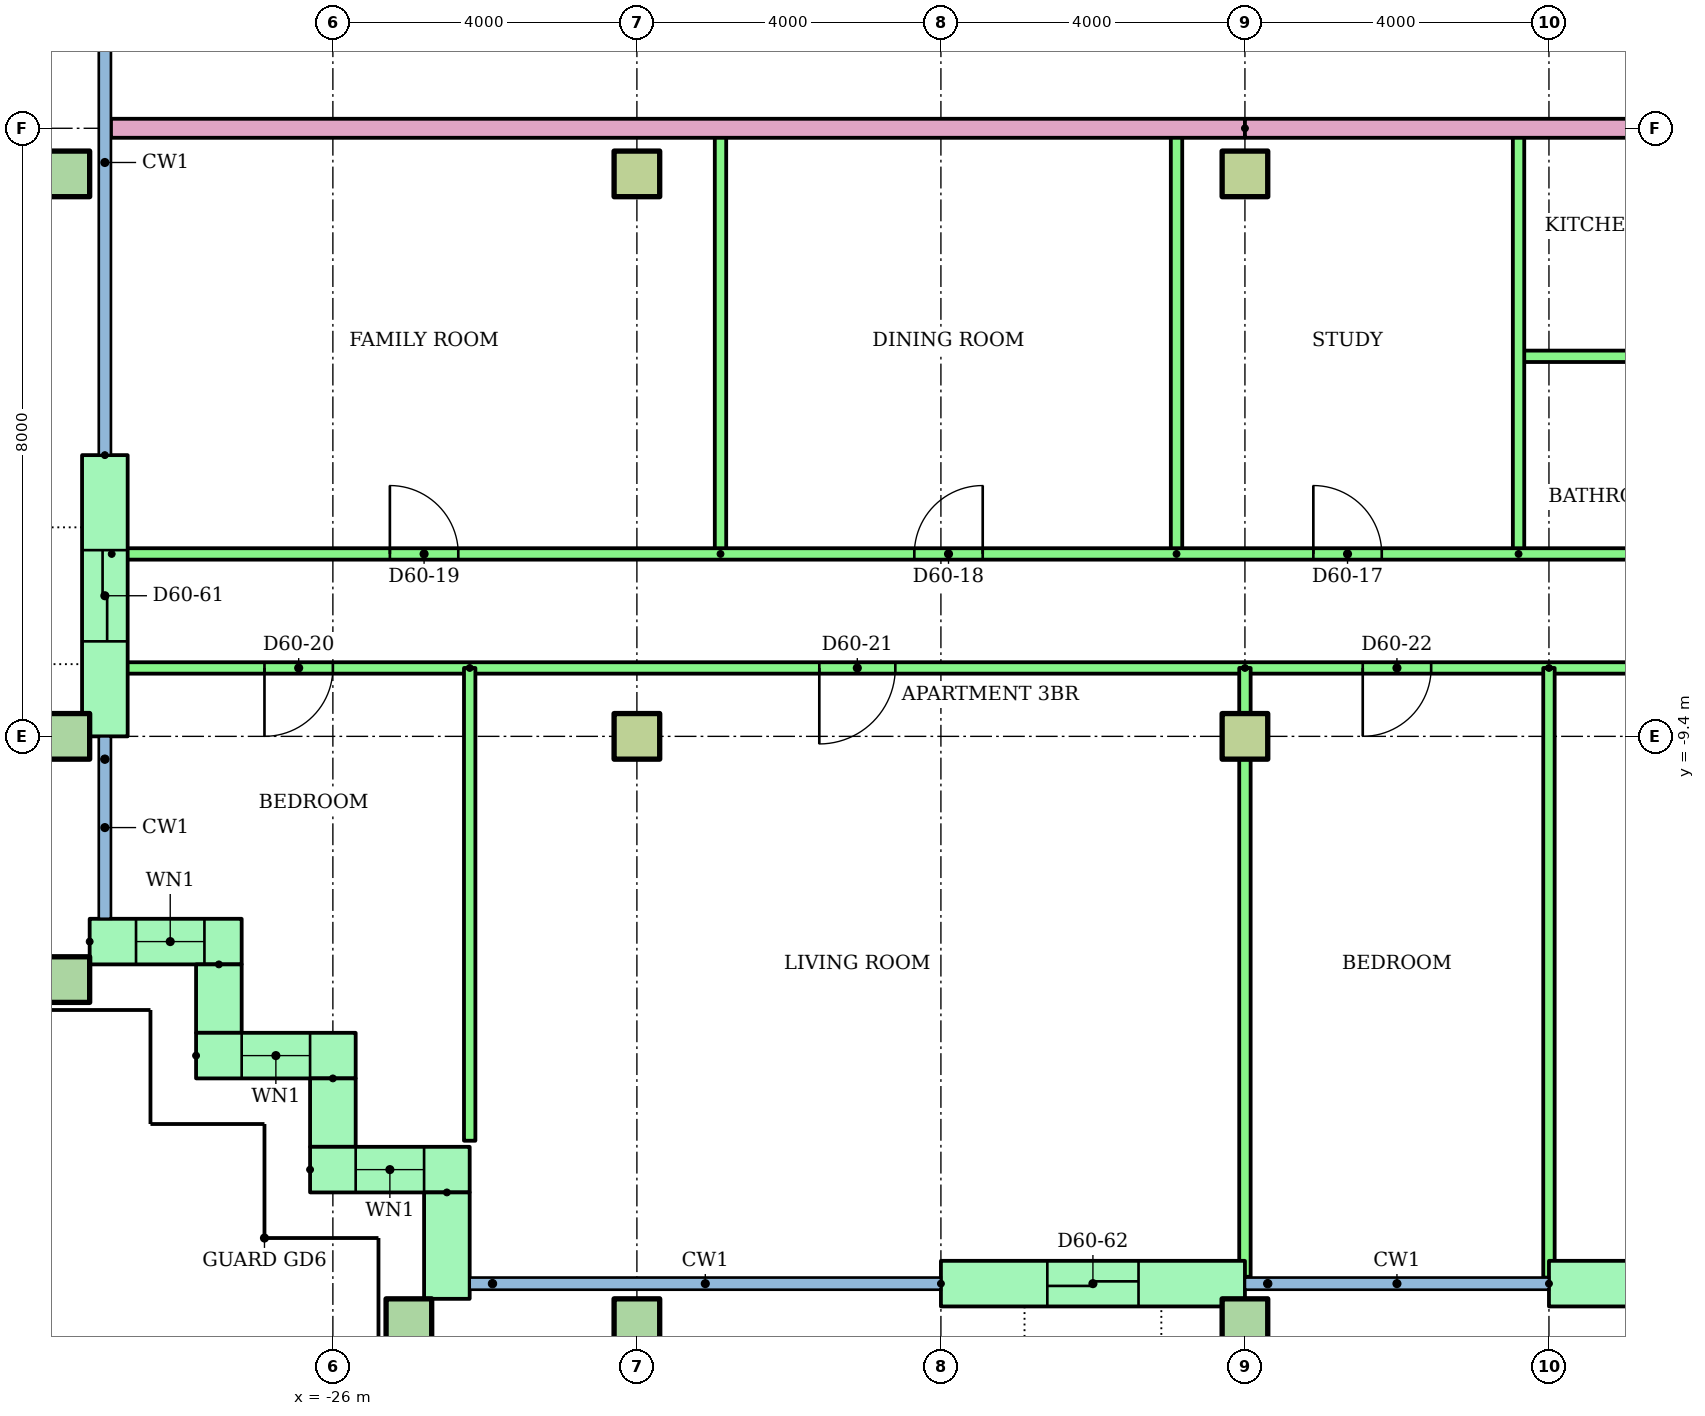
"""IFC4 building model, lengths in metres.
Left out: names, types, materials, properties, quantities, classifications, styles, units other than length and angle.
Written with IfcOpenShell. Run it as: python <this file> out.ifc"""

import sys

from ifc_helpers import new_model, si_unit, direction, frame, frame_2d, origin, origin_2d, place, context, subcontext, project, spatial, rectangle, hollow_rectangle, extrude, element, fill, save


model = new_model("IFC4")
c1 = context("Model", 3, precision=1e-05, world=origin(), true_north=direction((0.0, 1.0)))
c2 = subcontext(c1, "Body", "Model", "MODEL_VIEW")
j1 = project(units=[si_unit("LENGTHUNIT", "METRE"), si_unit("PLANEANGLEUNIT", "RADIAN")], contexts=[c1])
p1 = place(None, origin())
s1 = spatial("IfcSite", under=j1, at=p1, CompositionType="ELEMENT")
p2 = place(p1, origin())
s2 = spatial("IfcBuilding", under=s1, at=p2, CompositionType="ELEMENT")
p3 = place(p2, frame((0.0, 0.0, 230.0)))
s3 = spatial("IfcBuildingStorey", under=s2, at=p3, CompositionType="ELEMENT", Elevation=230.0)
for number, where in (
    (1, (-25.0, -17.1, 0.0)),
    (2, (-22.0, -17.1, 0.0)),
    (3, (-14.0, -17.1, 0.0)),
    (4, (-29.5, -12.6, 0.0)),
    (5, (-29.5, -9.4, 0.0)),
):
    element("IfcColumn", number, at=place(p3, frame(where)), inside=s3, PredefinedType="COLUMN", context=c2, shape_type="SweptSolid", body=[
        extrude(hollow_rectangle(XDim=0.6, YDim=0.6, WallThickness=0.03, at=origin_2d()), origin(), (0.0, 0.0, 1.0), 3.2),
    ])
for number, where in (
    (6, (-22.0, -9.4, 0.0)),
    (7, (-14.0, -9.4, 0.0)),
):
    element("IfcColumn", number, at=place(p3, frame(where)), inside=s3, PredefinedType="COLUMN", context=c2, shape_type="SweptSolid", body=[
        extrude(rectangle(XDim=0.6, YDim=0.6, at=origin_2d()), origin(), (0.0, 0.0, 1.0), 3.2),
    ])
p4 = place(p3, frame((-29.5, -2.0, 0.0)))
e8 = element("IfcColumn", 8, at=p4, inside=s3, PredefinedType="COLUMN", context=c2, shape_type="SweptSolid", body=[
    extrude(hollow_rectangle(XDim=0.6, YDim=0.6, WallThickness=0.03, at=origin_2d()), origin(), (0.0, 0.0, 1.0), 3.2),
])
for number, where in (
    (9, (-22.0, -2.0, 0.0)),
    (10, (-14.0, -2.0, 0.0)),
):
    element("IfcColumn", number, at=place(p3, frame(where)), inside=s3, PredefinedType="COLUMN", context=c2, shape_type="SweptSolid", body=[
        extrude(rectangle(XDim=0.6, YDim=0.6, at=origin_2d()), origin(), (0.0, 0.0, 1.0), 3.2),
    ])
p5 = place(p3, frame((-29.0, -5.7, 0.0), z_axis=(0.0, 0.0, 1.0), x_axis=(0.0, -1.0, 0.0)))
e11 = element("IfcWall", 11, at=p5, inside=s3, PredefinedType="STANDARD", context=c2, shape_type="SweptSolid", body=[
    extrude(rectangle(XDim=3.7, YDim=0.6, at=frame_2d((1.85, 0.0))), origin(), (0.0, 0.0, 1.0), 2.92),
])
p6 = place(p5, frame((1.25, 0.0, 0.0)))
e12 = element("IfcOpeningElement", 12, at=p6, cuts=e11, PredefinedType="OPENING", context=c2, shape_type="SweptSolid", body=[
    extrude(rectangle(XDim=1.2, YDim=2.1, at=frame_2d((0.6, 1.05))), frame((0.0, 0.31, 0.0), z_axis=(0.0, -1.0, 0.0), x_axis=(1.0, 0.0, 0.0)), (0.0, 0.0, 1.0), 0.62),
])
p7 = place(p3, frame((-29.2, -12.1, 0.0)))
e13 = element("IfcWall", 13, at=p7, inside=s3, PredefinedType="STANDARD", context=c2, shape_type="SweptSolid", body=[
    extrude(rectangle(XDim=2.0, YDim=0.6, at=frame_2d((1.0, 0.0))), origin(), (0.0, 0.0, 1.0), 2.92),
])
p8 = place(p7, frame((0.61, 0.0, 0.9)))
e14 = element("IfcOpeningElement", 14, at=p8, cuts=e13, PredefinedType="OPENING", context=c2, shape_type="SweptSolid", body=[
    extrude(rectangle(XDim=0.9, YDim=1.5, at=frame_2d((0.45, 0.75))), frame((0.0, 0.31, 0.0), z_axis=(0.0, -1.0, 0.0), x_axis=(1.0, 0.0, 0.0)), (0.0, 0.0, 1.0), 0.62),
])
p9 = place(p3, frame((-27.5, -12.4, 0.0), z_axis=(0.0, 0.0, 1.0), x_axis=(0.0, -1.0, 0.0)))
e15 = element("IfcWall", 15, at=p9, inside=s3, PredefinedType="STANDARD", context=c2, shape_type="SweptSolid", body=[
    extrude(rectangle(XDim=0.9, YDim=0.6, at=frame_2d((0.45, 0.0))), origin(), (0.0, 0.0, 1.0), 2.92),
])
p10 = place(p3, frame((-27.8, -13.6, 0.0)))
e16 = element("IfcWall", 16, at=p10, inside=s3, PredefinedType="STANDARD", context=c2, shape_type="SweptSolid", body=[
    extrude(rectangle(XDim=2.1, YDim=0.6, at=frame_2d((1.05, 0.0))), origin(), (0.0, 0.0, 1.0), 2.92),
])
p11 = place(p10, frame((0.6, 0.0, 0.9)))
e17 = element("IfcOpeningElement", 17, at=p11, cuts=e16, PredefinedType="OPENING", context=c2, shape_type="SweptSolid", body=[
    extrude(rectangle(XDim=0.9, YDim=1.5, at=frame_2d((0.45, 0.75))), frame((0.0, 0.31, 0.0), z_axis=(0.0, -1.0, 0.0), x_axis=(1.0, 0.0, 0.0)), (0.0, 0.0, 1.0), 0.62),
])
p12 = place(p3, frame((-26.0, -13.9, 0.0), z_axis=(0.0, 0.0, 1.0), x_axis=(0.0, -1.0, 0.0)))
e18 = element("IfcWall", 18, at=p12, inside=s3, PredefinedType="STANDARD", context=c2, shape_type="SweptSolid", body=[
    extrude(rectangle(XDim=0.9, YDim=0.6, at=frame_2d((0.45, 0.0))), origin(), (0.0, 0.0, 1.0), 2.92),
])
p13 = place(p3, frame((-26.3, -15.1, 0.0)))
e19 = element("IfcWall", 19, at=p13, inside=s3, PredefinedType="STANDARD", context=c2, shape_type="SweptSolid", body=[
    extrude(rectangle(XDim=2.1, YDim=0.6, at=frame_2d((1.05, 0.0))), origin(), (0.0, 0.0, 1.0), 2.92),
])
p14 = place(p13, frame((0.6, 0.0, 0.9)))
e20 = element("IfcOpeningElement", 20, at=p14, cuts=e19, PredefinedType="OPENING", context=c2, shape_type="SweptSolid", body=[
    extrude(rectangle(XDim=0.9, YDim=1.5, at=frame_2d((0.45, 0.75))), frame((0.0, 0.31, 0.0), z_axis=(0.0, -1.0, 0.0), x_axis=(1.0, 0.0, 0.0)), (0.0, 0.0, 1.0), 0.62),
])
p15 = place(p3, frame((-24.5, -15.4, 0.0), z_axis=(0.0, 0.0, 1.0), x_axis=(0.0, -1.0, 0.0)))
e21 = element("IfcWall", 21, at=p15, inside=s3, PredefinedType="STANDARD", context=c2, shape_type="SweptSolid", body=[
    extrude(rectangle(XDim=1.4, YDim=0.6, at=frame_2d((0.7, 0.0))), origin(), (0.0, 0.0, 1.0), 2.92),
])
p16 = place(p3, frame((-18.0, -16.6, 0.0)))
e22 = element("IfcWall", 22, at=p16, inside=s3, PredefinedType="STANDARD", context=c2, shape_type="SweptSolid", body=[
    extrude(rectangle(XDim=4.0, YDim=0.6, at=frame_2d((2.0, 0.0))), origin(), (0.0, 0.0, 1.0), 2.92),
])
p17 = place(p16, frame((1.4, 0.0, 0.0)))
e23 = element("IfcOpeningElement", 23, at=p17, cuts=e22, PredefinedType="OPENING", context=c2, shape_type="SweptSolid", body=[
    extrude(rectangle(XDim=1.2, YDim=2.1, at=frame_2d((0.6, 1.05))), frame((0.0, 0.31, 0.0), z_axis=(0.0, -1.0, 0.0), x_axis=(1.0, 0.0, 0.0)), (0.0, 0.0, 1.0), 0.62),
])
p18 = place(p3, frame((-10.0, -16.6, 0.0)))
e24 = element("IfcWall", 24, at=p18, inside=s3, PredefinedType="STANDARD", context=c2, shape_type="SweptSolid", body=[
    extrude(rectangle(XDim=4.0, YDim=0.6, at=frame_2d((2.0, 0.0))), origin(), (0.0, 0.0, 1.0), 2.92),
])
p19 = place(p18, frame((1.4, 0.0, 0.0)))
e25 = element("IfcOpeningElement", 25, at=p19, cuts=e24, PredefinedType="OPENING", context=c2, shape_type="SweptSolid", body=[
    extrude(rectangle(XDim=1.2, YDim=2.1, at=frame_2d((0.6, 1.05))), frame((0.0, 0.31, 0.0), z_axis=(0.0, -1.0, 0.0), x_axis=(1.0, 0.0, 0.0)), (0.0, 0.0, 1.0), 0.62),
])
p20 = place(p3, frame((-8.0, -4.4, 0.0), z_axis=(0.0, 0.0, 1.0), x_axis=(-1.0, 0.0, 0.0)))
e26 = element("IfcWall", 26, at=p20, inside=s3, PredefinedType="PARTITIONING", context=c2, shape_type="SweptSolid", body=[
    extrude(rectangle(XDim=2.4, YDim=0.15, at=frame_2d((1.2, 0.0))), origin(), (0.0, 0.0, 1.0), 2.4),
])
for number, where, z_axis, x_axis in (
    (27, (-10.4, -7.0, 0.0), (0.0, 0.0, 1.0), (0.0, 1.0, 0.0)),
    (28, (-14.9, -7.0, 0.0), (0.0, 0.0, 1.0), (0.0, 1.0, 0.0)),
    (29, (-20.9, -7.0, 0.0), (0.0, 0.0, 1.0), (0.0, 1.0, 0.0)),
):
    element("IfcWall", number, at=place(p3, frame(where, z_axis=z_axis, x_axis=x_axis)), inside=s3, PredefinedType="PARTITIONING", context=c2, shape_type="SweptSolid", body=[
        extrude(rectangle(XDim=5.6, YDim=0.15, at=frame_2d((2.8, 0.0))), origin(), (0.0, 0.0, 1.0), 2.4),
    ])
p21 = place(p3, frame((-28.91, -7.0, 0.0)))
e30 = element("IfcWall", 30, at=p21, inside=s3, PredefinedType="PARTITIONING", context=c2, shape_type="SweptSolid", body=[
    extrude(rectangle(XDim=20.91, YDim=0.15, at=frame_2d((10.455, 0.0))), origin(), (0.0, 0.0, 1.0), 2.4),
])
p22 = place(p21, frame((15.81, 0.0, 0.0)))
e31 = element("IfcOpeningElement", 31, at=p22, cuts=e30, PredefinedType="OPENING", context=c2, shape_type="SweptSolid", body=[
    extrude(rectangle(XDim=0.9, YDim=2.1, at=frame_2d((0.45, 1.05))), frame((0.0, 0.085, 0.0), z_axis=(0.0, -1.0, 0.0), x_axis=(1.0, 0.0, 0.0)), (0.0, 0.0, 1.0), 0.17),
])
p23 = place(p21, frame((10.56, 0.0, 0.0)))
e32 = element("IfcOpeningElement", 32, at=p23, cuts=e30, PredefinedType="OPENING", context=c2, shape_type="SweptSolid", body=[
    extrude(rectangle(XDim=0.9, YDim=2.1, at=frame_2d((0.45, 1.05))), frame((0.0, 0.085, 0.0), z_axis=(0.0, -1.0, 0.0), x_axis=(1.0, 0.0, 0.0)), (0.0, 0.0, 1.0), 0.17),
])
p24 = place(p21, frame((3.66, 0.0, 0.0)))
e33 = element("IfcOpeningElement", 33, at=p24, cuts=e30, PredefinedType="OPENING", context=c2, shape_type="SweptSolid", body=[
    extrude(rectangle(XDim=0.9, YDim=2.1, at=frame_2d((0.45, 1.05))), frame((0.0, 0.085, 0.0), z_axis=(0.0, -1.0, 0.0), x_axis=(1.0, 0.0, 0.0)), (0.0, 0.0, 1.0), 0.17),
])
p25 = place(p3, frame((-6.0, -8.5, 0.0), z_axis=(0.0, 0.0, 1.0), x_axis=(-1.0, 0.0, 0.0)))
e34 = element("IfcWall", 34, at=p25, inside=s3, PredefinedType="PARTITIONING", context=c2, shape_type="SweptSolid", body=[
    extrude(rectangle(XDim=22.91, YDim=0.15, at=frame_2d((11.455, 0.0))), origin(), (0.0, 0.0, 1.0), 2.4),
])
p26 = place(p25, frame((20.0, 0.0, 0.0)))
e35 = element("IfcOpeningElement", 35, at=p26, cuts=e34, PredefinedType="OPENING", context=c2, shape_type="SweptSolid", body=[
    extrude(rectangle(XDim=0.9, YDim=2.1, at=frame_2d((0.45, 1.05))), frame((0.0, 0.085, 0.0), z_axis=(0.0, -1.0, 0.0), x_axis=(1.0, 0.0, 0.0)), (0.0, 0.0, 1.0), 0.17),
])
p27 = place(p25, frame((12.6, 0.0, 0.0)))
e36 = element("IfcOpeningElement", 36, at=p27, cuts=e34, PredefinedType="OPENING", context=c2, shape_type="SweptSolid", body=[
    extrude(rectangle(XDim=1.0, YDim=2.1, at=frame_2d((0.5, 1.05))), frame((0.0, 0.085, 0.0), z_axis=(0.0, -1.0, 0.0), x_axis=(1.0, 0.0, 0.0)), (0.0, 0.0, 1.0), 0.17),
])
p28 = place(p25, frame((5.55, 0.0, 0.0)))
e37 = element("IfcOpeningElement", 37, at=p28, cuts=e34, PredefinedType="OPENING", context=c2, shape_type="SweptSolid", body=[
    extrude(rectangle(XDim=0.9, YDim=2.1, at=frame_2d((0.45, 1.05))), frame((0.0, 0.085, 0.0), z_axis=(0.0, -1.0, 0.0), x_axis=(1.0, 0.0, 0.0)), (0.0, 0.0, 1.0), 0.17),
])
p29 = place(p25, frame((1.55, 0.0, 0.0)))
e38 = element("IfcOpeningElement", 38, at=p29, cuts=e34, PredefinedType="OPENING", context=c2, shape_type="SweptSolid", body=[
    extrude(rectangle(XDim=0.9, YDim=2.1, at=frame_2d((0.45, 1.05))), frame((0.0, 0.085, 0.0), z_axis=(0.0, -1.0, 0.0), x_axis=(1.0, 0.0, 0.0)), (0.0, 0.0, 1.0), 0.17),
])
p30 = place(p3, frame((-24.2, -8.5, 0.0), z_axis=(0.0, 0.0, 1.0), x_axis=(0.0, -1.0, 0.0)))
e39 = element("IfcWall", 39, at=p30, inside=s3, PredefinedType="PARTITIONING", context=c2, shape_type="SweptSolid", body=[
    extrude(rectangle(XDim=6.22, YDim=0.15, at=frame_2d((3.11, 0.0))), origin(), (0.0, 0.0, 1.0), 2.4),
])
p31 = place(p3, frame((-14.0, -8.5, 0.0), z_axis=(0.0, 0.0, 1.0), x_axis=(0.0, -1.0, 0.0)))
e40 = element("IfcWall", 40, at=p31, inside=s3, PredefinedType="PARTITIONING", context=c2, shape_type="SweptSolid", body=[
    extrude(rectangle(XDim=8.01, YDim=0.15, at=frame_2d((4.005, 0.0))), origin(), (0.0, 0.0, 1.0), 2.4),
])
p32 = place(p3, frame((-10.0, -8.5, 0.0), z_axis=(0.0, 0.0, 1.0), x_axis=(0.0, -1.0, 0.0)))
e41 = element("IfcWall", 41, at=p32, inside=s3, PredefinedType="PARTITIONING", context=c2, shape_type="SweptSolid", body=[
    extrude(rectangle(XDim=8.021, YDim=0.15, at=frame_2d((4.01, 0.0))), origin(), (0.0, 0.0, 1.0), 2.4),
])
p33 = place(p3, frame((-14.0, -1.4, 0.0), z_axis=(0.0, 0.0, 1.0), x_axis=(-1.0, 0.0, 0.0)))
e42 = element("IfcWall", 42, at=p33, inside=s3, PredefinedType="PARTITIONING", context=c2, shape_type="SweptSolid", body=[
    extrude(rectangle(XDim=14.92, YDim=0.25, at=frame_2d((7.46, 0.0))), origin(), (0.0, 0.0, 1.0), 2.4),
])
p34 = place(p3, frame((14.0, -1.4, 0.0), z_axis=(0.0, 0.0, 1.0), x_axis=(-1.0, 0.0, 0.0)))
e43 = element("IfcWall", 43, at=p34, inside=s3, PredefinedType="PARTITIONING", context=c2, shape_type="SweptSolid", body=[
    extrude(rectangle(XDim=28.0, YDim=0.25, at=frame_2d((14.0, 0.0))), origin(), (0.0, 0.0, 1.0), 2.4),
])
p35 = place(p34, frame((20.5, 0.0, 0.0)))
e44 = element("IfcOpeningElement", 44, at=p35, cuts=e43, PredefinedType="OPENING", context=c2, shape_type="SweptSolid", body=[
    extrude(rectangle(XDim=1.0, YDim=2.1, at=frame_2d((0.5, 1.05))), frame((0.0, 0.135, 0.0), z_axis=(0.0, -1.0, 0.0), x_axis=(1.0, 0.0, 0.0)), (0.0, 0.0, 1.0), 0.27),
])
p36 = place(p34, frame((18.5, 0.0, 0.0)))
e45 = element("IfcOpeningElement", 45, at=p36, cuts=e43, PredefinedType="OPENING", context=c2, shape_type="SweptSolid", body=[
    extrude(rectangle(XDim=1.0, YDim=2.1, at=frame_2d((0.5, 1.05))), frame((0.0, 0.135, 0.0), z_axis=(0.0, -1.0, 0.0), x_axis=(1.0, 0.0, 0.0)), (0.0, 0.0, 1.0), 0.27),
])
p37 = place(p34, frame((2.5, 0.0, 0.0)))
e46 = element("IfcOpeningElement", 46, at=p37, cuts=e43, PredefinedType="OPENING", context=c2, shape_type="SweptSolid", body=[
    extrude(rectangle(XDim=1.0, YDim=2.1, at=frame_2d((0.5, 1.05))), frame((0.0, 0.135, 0.0), z_axis=(0.0, -1.0, 0.0), x_axis=(1.0, 0.0, 0.0)), (0.0, 0.0, 1.0), 0.27),
])
p38 = place(p8, origin())
e47 = element("IfcWindow", 47, at=p38, inside=s3, PartitioningType="SINGLE_PANEL", PredefinedType="WINDOW", context=c2, shape_type="SweptSolid", body=[
    extrude(rectangle(XDim=0.9, YDim=1.5, at=frame_2d((0.45, 0.75))), frame((0.0, 0.03, 0.0), z_axis=(0.0, -1.0, 0.0), x_axis=(1.0, 0.0, 0.0)), (0.0, 0.0, 1.0), 0.06),
])
fill(e14, e47)
p39 = place(p11, origin())
e48 = element("IfcWindow", 48, at=p39, inside=s3, PartitioningType="SINGLE_PANEL", PredefinedType="WINDOW", context=c2, shape_type="SweptSolid", body=[
    extrude(rectangle(XDim=0.9, YDim=1.5, at=frame_2d((0.45, 0.75))), frame((0.0, 0.03, 0.0), z_axis=(0.0, -1.0, 0.0), x_axis=(1.0, 0.0, 0.0)), (0.0, 0.0, 1.0), 0.06),
])
fill(e17, e48)
p40 = place(p14, origin())
e49 = element("IfcWindow", 49, at=p40, inside=s3, PartitioningType="SINGLE_PANEL", PredefinedType="WINDOW", context=c2, shape_type="SweptSolid", body=[
    extrude(rectangle(XDim=0.9, YDim=1.5, at=frame_2d((0.45, 0.75))), frame((0.0, 0.03, 0.0), z_axis=(0.0, -1.0, 0.0), x_axis=(1.0, 0.0, 0.0)), (0.0, 0.0, 1.0), 0.06),
])
fill(e20, e49)
p41 = place(p22, origin())
e50 = element("IfcDoor", 50, at=p41, inside=s3, OperationType="SINGLE_SWING_LEFT", PredefinedType="DOOR", context=c2, shape_type="SweptSolid", body=[
    extrude(rectangle(XDim=0.9, YDim=2.1, at=frame_2d((0.45, 1.05))), frame((0.0, 0.025, 0.0), z_axis=(0.0, -1.0, 0.0), x_axis=(1.0, 0.0, 0.0)), (0.0, 0.0, 1.0), 0.05),
])
fill(e31, e50)
p42 = place(p23, origin())
e51 = element("IfcDoor", 51, at=p42, inside=s3, OperationType="SINGLE_SWING_RIGHT", PredefinedType="DOOR", context=c2, shape_type="SweptSolid", body=[
    extrude(rectangle(XDim=0.9, YDim=2.1, at=frame_2d((0.45, 1.05))), frame((0.0, 0.025, 0.0), z_axis=(0.0, -1.0, 0.0), x_axis=(1.0, 0.0, 0.0)), (0.0, 0.0, 1.0), 0.05),
])
fill(e32, e51)
p43 = place(p24, origin())
e52 = element("IfcDoor", 52, at=p43, inside=s3, OperationType="SINGLE_SWING_LEFT", PredefinedType="DOOR", context=c2, shape_type="SweptSolid", body=[
    extrude(rectangle(XDim=0.9, YDim=2.1, at=frame_2d((0.45, 1.05))), frame((0.0, 0.025, 0.0), z_axis=(0.0, -1.0, 0.0), x_axis=(1.0, 0.0, 0.0)), (0.0, 0.0, 1.0), 0.05),
])
fill(e33, e52)
p44 = place(p26, origin())
e53 = element("IfcDoor", 53, at=p44, inside=s3, OperationType="SINGLE_SWING_RIGHT", PredefinedType="DOOR", context=c2, shape_type="SweptSolid", body=[
    extrude(rectangle(XDim=0.9, YDim=2.1, at=frame_2d((0.45, 1.05))), frame((0.0, 0.025, 0.0), z_axis=(0.0, -1.0, 0.0), x_axis=(1.0, 0.0, 0.0)), (0.0, 0.0, 1.0), 0.05),
])
fill(e35, e53)
p45 = place(p27, origin())
e54 = element("IfcDoor", 54, at=p45, inside=s3, OperationType="SINGLE_SWING_RIGHT", PredefinedType="DOOR", context=c2, shape_type="SweptSolid", body=[
    extrude(rectangle(XDim=1.0, YDim=2.1, at=frame_2d((0.5, 1.05))), frame((0.0, 0.025, 0.0), z_axis=(0.0, -1.0, 0.0), x_axis=(1.0, 0.0, 0.0)), (0.0, 0.0, 1.0), 0.05),
])
fill(e36, e54)
p46 = place(p28, origin())
e55 = element("IfcDoor", 55, at=p46, inside=s3, OperationType="SINGLE_SWING_RIGHT", PredefinedType="DOOR", context=c2, shape_type="SweptSolid", body=[
    extrude(rectangle(XDim=0.9, YDim=2.1, at=frame_2d((0.45, 1.05))), frame((0.0, 0.025, 0.0), z_axis=(0.0, -1.0, 0.0), x_axis=(1.0, 0.0, 0.0)), (0.0, 0.0, 1.0), 0.05),
])
fill(e37, e55)
p47 = place(p6, origin())
e56 = element("IfcDoor", 56, at=p47, inside=s3, OperationType="SLIDING_TO_LEFT", PredefinedType="DOOR", context=c2, shape_type="SweptSolid", body=[
    extrude(rectangle(XDim=1.2, YDim=2.1, at=frame_2d((0.6, 1.05))), frame((0.0, 0.025, 0.0), z_axis=(0.0, -1.0, 0.0), x_axis=(1.0, 0.0, 0.0)), (0.0, 0.0, 1.0), 0.05),
])
fill(e12, e56)
p48 = place(p17, origin())
e57 = element("IfcDoor", 57, at=p48, inside=s3, OperationType="SLIDING_TO_LEFT", PredefinedType="DOOR", context=c2, shape_type="SweptSolid", body=[
    extrude(rectangle(XDim=1.2, YDim=2.1, at=frame_2d((0.6, 1.05))), frame((0.0, 0.025, 0.0), z_axis=(0.0, -1.0, 0.0), x_axis=(1.0, 0.0, 0.0)), (0.0, 0.0, 1.0), 0.05),
])
fill(e23, e57)
save(model, sys.argv[1])
